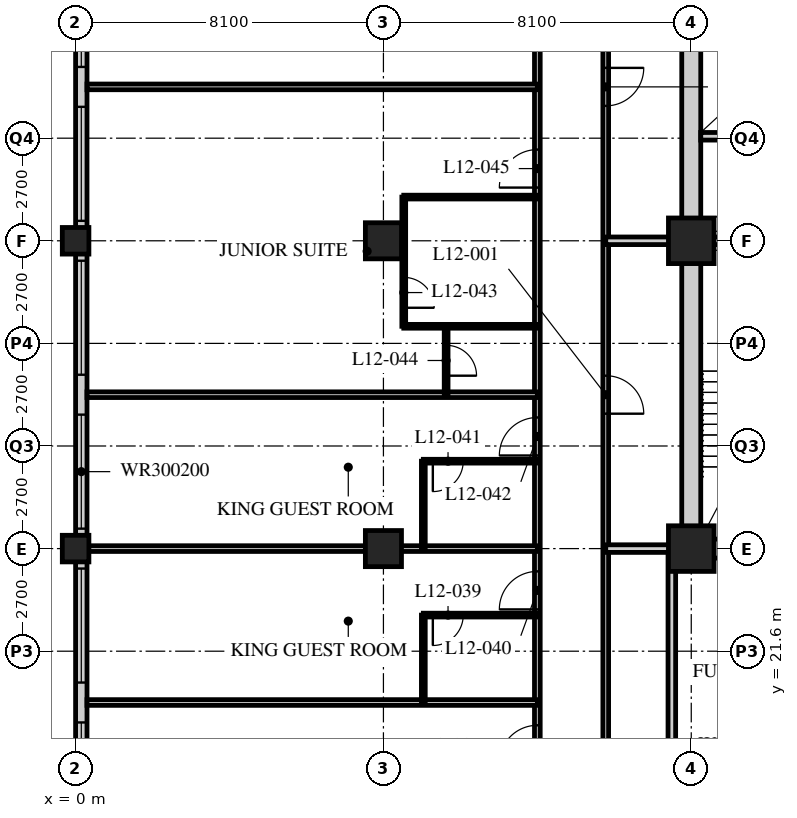
"""IFC4 building model, lengths in metres.
Left out: names, types, materials, properties, quantities, classifications, styles, units other than length and angle.
Written with IfcOpenShell. Run it as: python <this file> out.ifc"""

import sys

from ifc_helpers import new_model, si_unit, direction, frame, frame_2d, origin, origin_2d, place, context, subcontext, project, spatial, rectangle, hollow_rectangle, extrude, element, fill, save


model = new_model("IFC4")
c1 = context("Model", 3, precision=1e-05, world=origin(), true_north=direction((0.0, 1.0)))
c2 = subcontext(c1, "Body", "Model", "MODEL_VIEW")
j1 = project(units=[si_unit("LENGTHUNIT", "METRE"), si_unit("PLANEANGLEUNIT", "RADIAN")], contexts=[c1])
p1 = place(None, origin())
s1 = spatial("IfcSite", under=j1, at=p1, CompositionType="ELEMENT")
p2 = place(p1, origin())
s2 = spatial("IfcBuilding", under=s1, at=p2, CompositionType="ELEMENT")
p3 = place(p2, frame((0.0, 0.0, 53.4)))
s3 = spatial("IfcBuildingStorey", under=s2, at=p3, CompositionType="ELEMENT", Elevation=53.4)
for number, where, z_axis, x_axis in (
    (1, (0.0, 24.3, 0.0), (0.0, 0.0, 1.0), (1.0, 0.0, 0.0)),
    (2, (0.0, 32.4, 0.0), (0.0, 0.0, 1.0), (1.0, 0.0, 0.0)),
):
    element("IfcColumn", number, at=place(p3, frame(where, z_axis=z_axis, x_axis=x_axis)), inside=s3, PredefinedType="COLUMN", context=c2, shape_type="SweptSolid", body=[
        extrude(hollow_rectangle(XDim=0.7, YDim=0.7, WallThickness=0.06, at=origin_2d()), origin(), (0.0, 0.0, 1.0), 3.4),
    ])
for number, where, z_axis, x_axis in (
    (3, (8.1, 24.3, 0.0), (0.0, 0.0, 1.0), (1.0, 0.0, 0.0)),
    (4, (8.1, 32.4, 0.0), (0.0, 0.0, 1.0), (1.0, 0.0, 0.0)),
):
    element("IfcColumn", number, at=place(p3, frame(where, z_axis=z_axis, x_axis=x_axis)), inside=s3, PredefinedType="COLUMN", context=c2, shape_type="SweptSolid", body=[
        extrude(hollow_rectangle(XDim=0.95, YDim=0.95, WallThickness=0.095, at=origin_2d()), origin(), (0.0, 0.0, 1.0), 3.4),
    ])
for number, where, z_axis, x_axis in (
    (5, (16.2, 24.3, 0.0), (0.0, 0.0, 1.0), (1.0, 0.0, 0.0)),
    (6, (16.2, 32.4, 0.0), (0.0, 0.0, 1.0), (1.0, 0.0, 0.0)),
):
    element("IfcColumn", number, at=place(p3, frame(where, z_axis=z_axis, x_axis=x_axis)), inside=s3, PredefinedType="COLUMN", context=c2, shape_type="SweptSolid", body=[
        extrude(hollow_rectangle(XDim=1.2, YDim=1.2, WallThickness=0.12, at=origin_2d()), origin(), (0.0, 0.0, 1.0), 3.4),
    ])
p4 = place(p3, frame((0.15, 40.2, 0.0), z_axis=(0.0, 0.0, 1.0), x_axis=(0.0, -1.0, 0.0)))
e7 = element("IfcWall", 7, at=p4, inside=s3, PredefinedType="SOLIDWALL", context=c2, shape_type="SweptSolid", body=[
    extrude(rectangle(XDim=32.1, YDim=0.3, at=frame_2d((16.05, 0.0))), origin(), (0.0, 0.0, 1.0), 3.19),
])
p5 = place(p4, frame((0.225, 0.0, 0.9)))
e8 = element("IfcOpeningElement", 8, at=p5, cuts=e7, PredefinedType="OPENING", context=c2, shape_type="SweptSolid", body=[
    extrude(rectangle(XDim=3.0, YDim=2.0, at=frame_2d((1.5, 1.0))), frame((0.0, 0.16, 0.0), z_axis=(0.0, -1.0, 0.0), x_axis=(1.0, 0.0, 0.0)), (0.0, 0.0, 1.0), 0.32),
])
p6 = place(p4, frame((4.275, 0.0, 0.9)))
e9 = element("IfcOpeningElement", 9, at=p6, cuts=e7, PredefinedType="OPENING", context=c2, shape_type="SweptSolid", body=[
    extrude(rectangle(XDim=3.0, YDim=2.0, at=frame_2d((1.5, 1.0))), frame((0.0, 0.16, 0.0), z_axis=(0.0, -1.0, 0.0), x_axis=(1.0, 0.0, 0.0)), (0.0, 0.0, 1.0), 0.32),
])
p7 = place(p4, frame((8.325, 0.0, 0.9)))
e10 = element("IfcOpeningElement", 10, at=p7, cuts=e7, PredefinedType="OPENING", context=c2, shape_type="SweptSolid", body=[
    extrude(rectangle(XDim=3.0, YDim=2.0, at=frame_2d((1.5, 1.0))), frame((0.0, 0.16, 0.0), z_axis=(0.0, -1.0, 0.0), x_axis=(1.0, 0.0, 0.0)), (0.0, 0.0, 1.0), 0.32),
])
p8 = place(p4, frame((12.375, 0.0, 0.9)))
e11 = element("IfcOpeningElement", 11, at=p8, cuts=e7, PredefinedType="OPENING", context=c2, shape_type="SweptSolid", body=[
    extrude(rectangle(XDim=3.0, YDim=2.0, at=frame_2d((1.5, 1.0))), frame((0.0, 0.16, 0.0), z_axis=(0.0, -1.0, 0.0), x_axis=(1.0, 0.0, 0.0)), (0.0, 0.0, 1.0), 0.32),
])
p9 = place(p4, frame((16.425, 0.0, 0.9)))
e12 = element("IfcOpeningElement", 12, at=p9, cuts=e7, PredefinedType="OPENING", context=c2, shape_type="SweptSolid", body=[
    extrude(rectangle(XDim=3.0, YDim=2.0, at=frame_2d((1.5, 1.0))), frame((0.0, 0.16, 0.0), z_axis=(0.0, -1.0, 0.0), x_axis=(1.0, 0.0, 0.0)), (0.0, 0.0, 1.0), 0.32),
])
p10 = place(p4, frame((20.475, 0.0, 0.9)))
e13 = element("IfcOpeningElement", 13, at=p10, cuts=e7, PredefinedType="OPENING", context=c2, shape_type="SweptSolid", body=[
    extrude(rectangle(XDim=3.0, YDim=2.0, at=frame_2d((1.5, 1.0))), frame((0.0, 0.16, 0.0), z_axis=(0.0, -1.0, 0.0), x_axis=(1.0, 0.0, 0.0)), (0.0, 0.0, 1.0), 0.32),
])
p11 = place(p4, frame((24.525, 0.0, 0.9)))
e14 = element("IfcOpeningElement", 14, at=p11, cuts=e7, PredefinedType="OPENING", context=c2, shape_type="SweptSolid", body=[
    extrude(rectangle(XDim=3.0, YDim=2.0, at=frame_2d((1.5, 1.0))), frame((0.0, 0.16, 0.0), z_axis=(0.0, -1.0, 0.0), x_axis=(1.0, 0.0, 0.0)), (0.0, 0.0, 1.0), 0.32),
])
p12 = place(p4, frame((28.575, 0.0, 0.9)))
e15 = element("IfcOpeningElement", 15, at=p12, cuts=e7, PredefinedType="OPENING", context=c2, shape_type="SweptSolid", body=[
    extrude(rectangle(XDim=3.0, YDim=2.0, at=frame_2d((1.5, 1.0))), frame((0.0, 0.16, 0.0), z_axis=(0.0, -1.0, 0.0), x_axis=(1.0, 0.0, 0.0)), (0.0, 0.0, 1.0), 0.32),
])
p13 = place(p3, frame((12.15, 12.15, 0.0), z_axis=(0.0, 0.0, 1.0), x_axis=(0.0, 1.0, 0.0)))
e16 = element("IfcWall", 16, at=p13, inside=s3, PredefinedType="PARTITIONING", context=c2, shape_type="SweptSolid", body=[
    extrude(rectangle(XDim=30.15, YDim=0.15, at=frame_2d((15.075, 0.0))), origin(), (0.0, 0.0, 1.0), 3.19),
])
p14 = place(p13, frame((2.45, 0.0, 0.0)))
e17 = element("IfcOpeningElement", 17, at=p14, cuts=e16, PredefinedType="OPENING", context=c2, shape_type="SweptSolid", body=[
    extrude(rectangle(XDim=1.0, YDim=2.1, at=frame_2d((0.5, 1.05))), frame((0.0, 0.085, 0.0), z_axis=(0.0, -1.0, 0.0), x_axis=(1.0, 0.0, 0.0)), (0.0, 0.0, 1.0), 0.17),
])
p15 = place(p13, frame((6.5, 0.0, 0.0)))
e18 = element("IfcOpeningElement", 18, at=p15, cuts=e16, PredefinedType="OPENING", context=c2, shape_type="SweptSolid", body=[
    extrude(rectangle(XDim=1.0, YDim=2.1, at=frame_2d((0.5, 1.05))), frame((0.0, 0.085, 0.0), z_axis=(0.0, -1.0, 0.0), x_axis=(1.0, 0.0, 0.0)), (0.0, 0.0, 1.0), 0.17),
])
p16 = place(p13, frame((10.55, 0.0, 0.0)))
e19 = element("IfcOpeningElement", 19, at=p16, cuts=e16, PredefinedType="OPENING", context=c2, shape_type="SweptSolid", body=[
    extrude(rectangle(XDim=1.0, YDim=2.1, at=frame_2d((0.5, 1.05))), frame((0.0, 0.085, 0.0), z_axis=(0.0, -1.0, 0.0), x_axis=(1.0, 0.0, 0.0)), (0.0, 0.0, 1.0), 0.17),
])
p17 = place(p13, frame((14.6, 0.0, 0.0)))
e20 = element("IfcOpeningElement", 20, at=p17, cuts=e16, PredefinedType="OPENING", context=c2, shape_type="SweptSolid", body=[
    extrude(rectangle(XDim=1.0, YDim=2.1, at=frame_2d((0.5, 1.05))), frame((0.0, 0.085, 0.0), z_axis=(0.0, -1.0, 0.0), x_axis=(1.0, 0.0, 0.0)), (0.0, 0.0, 1.0), 0.17),
])
p18 = place(p13, frame((21.65, 0.0, 0.0)))
e21 = element("IfcOpeningElement", 21, at=p18, cuts=e16, PredefinedType="OPENING", context=c2, shape_type="SweptSolid", body=[
    extrude(rectangle(XDim=1.0, YDim=2.1, at=frame_2d((0.5, 1.05))), frame((0.0, 0.085, 0.0), z_axis=(0.0, -1.0, 0.0), x_axis=(1.0, 0.0, 0.0)), (0.0, 0.0, 1.0), 0.17),
])
p19 = place(p13, frame((26.7, 0.0, 0.0)))
e22 = element("IfcOpeningElement", 22, at=p19, cuts=e16, PredefinedType="OPENING", context=c2, shape_type="SweptSolid", body=[
    extrude(rectangle(XDim=1.0, YDim=2.1, at=frame_2d((0.5, 1.05))), frame((0.0, 0.085, 0.0), z_axis=(0.0, -1.0, 0.0), x_axis=(1.0, 0.0, 0.0)), (0.0, 0.0, 1.0), 0.17),
])
p20 = place(p3, frame((13.95, 40.5, 0.0), z_axis=(0.0, 0.0, 1.0), x_axis=(0.0, -1.0, 0.0)))
e23 = element("IfcWall", 23, at=p20, inside=s3, PredefinedType="PARTITIONING", context=c2, shape_type="SweptSolid", body=[
    extrude(rectangle(XDim=26.55, YDim=0.15, at=frame_2d((13.275, 0.0))), origin(), (0.0, 0.0, 1.0), 3.19),
])
p21 = place(p20, frame((11.65, 0.0, 0.0)))
e24 = element("IfcOpeningElement", 24, at=p21, cuts=e23, PredefinedType="OPENING", context=c2, shape_type="SweptSolid", body=[
    extrude(rectangle(XDim=1.0, YDim=2.1, at=frame_2d((0.5, 1.05))), frame((0.0, 0.085, 0.0), z_axis=(0.0, -1.0, 0.0), x_axis=(1.0, 0.0, 0.0)), (0.0, 0.0, 1.0), 0.17),
])
p22 = place(p20, frame((3.55, 0.0, 0.0)))
e25 = element("IfcOpeningElement", 25, at=p22, cuts=e23, PredefinedType="OPENING", context=c2, shape_type="SweptSolid", body=[
    extrude(rectangle(XDim=1.0, YDim=2.1, at=frame_2d((0.5, 1.05))), frame((0.0, 0.085, 0.0), z_axis=(0.0, -1.0, 0.0), x_axis=(1.0, 0.0, 0.0)), (0.0, 0.0, 1.0), 0.17),
])
p23 = place(p3, frame((13.95, 32.4, 0.0), z_axis=(0.0, 0.0, 1.0), x_axis=(1.0, 0.0, 0.0)))
e26 = element("IfcWall", 26, at=p23, inside=s3, PredefinedType="SOLIDWALL", context=c2, shape_type="SweptSolid", body=[
    extrude(rectangle(XDim=2.25, YDim=0.2, at=frame_2d((1.125, 0.0))), origin(), (0.0, 0.0, 1.0), 2.578),
])
p24 = place(p3, frame((15.689, 13.95, 0.0), z_axis=(0.0, 0.0, 1.0), x_axis=(0.0, 1.0, 0.0)))
e27 = element("IfcWall", 27, at=p24, inside=s3, PredefinedType="SOLIDWALL", context=c2, shape_type="SweptSolid", body=[
    extrude(rectangle(XDim=10.35, YDim=0.2, at=frame_2d((5.175, 0.0))), origin(), (0.0, 0.0, 1.0), 3.19),
])
p25 = place(p3, frame((13.95, 24.3, 0.0), z_axis=(0.0, 0.0, 1.0), x_axis=(1.0, 0.0, 0.0)))
e28 = element("IfcWall", 28, at=p25, inside=s3, PredefinedType="SOLIDWALL", context=c2, shape_type="SweptSolid", body=[
    extrude(rectangle(XDim=2.25, YDim=0.2, at=frame_2d((1.125, 0.0))), origin(), (0.0, 0.0, 1.0), 2.578),
])
p26 = place(p3, frame((12.15, 20.25, 0.0), z_axis=(0.0, 0.0, 1.0), x_axis=(-1.0, 0.0, 0.0)))
e29 = element("IfcWall", 29, at=p26, inside=s3, PredefinedType="PARTITIONING", context=c2, shape_type="SweptSolid", body=[
    extrude(rectangle(XDim=11.85, YDim=0.15, at=frame_2d((5.925, 0.0))), origin(), (0.0, 0.0, 1.0), 3.19),
])
p27 = place(p3, frame((9.15, 20.25, 0.0), z_axis=(0.0, 0.0, 1.0), x_axis=(0.0, 1.0, 0.0)))
e30 = element("IfcWall", 30, at=p27, inside=s3, PredefinedType="PARTITIONING", context=c2, shape_type="SweptSolid", body=[
    extrude(rectangle(XDim=2.3, YDim=0.1, at=frame_2d((1.15, 0.0))), origin(), (0.0, 0.0, 1.0), 3.19),
])
p28 = place(p3, frame((12.15, 22.55, 0.0), z_axis=(0.0, 0.0, 1.0), x_axis=(-1.0, 0.0, 0.0)))
e31 = element("IfcWall", 31, at=p28, inside=s3, PredefinedType="PARTITIONING", context=c2, shape_type="SweptSolid", body=[
    extrude(rectangle(XDim=3.0, YDim=0.1, at=frame_2d((1.5, 0.0))), origin(), (0.0, 0.0, 1.0), 3.19),
])
p29 = place(p28, frame((1.95, 0.0, 0.0)))
e32 = element("IfcOpeningElement", 32, at=p29, cuts=e31, PredefinedType="OPENING", context=c2, shape_type="SweptSolid", body=[
    extrude(rectangle(XDim=0.8, YDim=2.1, at=frame_2d((0.4, 1.05))), frame((0.0, 0.06, 0.0), z_axis=(0.0, -1.0, 0.0), x_axis=(1.0, 0.0, 0.0)), (0.0, 0.0, 1.0), 0.12),
])
p30 = place(p3, frame((12.15, 24.3, 0.0), z_axis=(0.0, 0.0, 1.0), x_axis=(-1.0, 0.0, 0.0)))
e33 = element("IfcWall", 33, at=p30, inside=s3, PredefinedType="PARTITIONING", context=c2, shape_type="SweptSolid", body=[
    extrude(rectangle(XDim=11.85, YDim=0.15, at=frame_2d((5.925, 0.0))), origin(), (0.0, 0.0, 1.0), 2.578),
])
p31 = place(p3, frame((9.15, 24.3, 0.0), z_axis=(0.0, 0.0, 1.0), x_axis=(0.0, 1.0, 0.0)))
e34 = element("IfcWall", 34, at=p31, inside=s3, PredefinedType="PARTITIONING", context=c2, shape_type="SweptSolid", body=[
    extrude(rectangle(XDim=2.3, YDim=0.1, at=frame_2d((1.15, 0.0))), origin(), (0.0, 0.0, 1.0), 3.19),
])
p32 = place(p3, frame((12.15, 26.6, 0.0), z_axis=(0.0, 0.0, 1.0), x_axis=(-1.0, 0.0, 0.0)))
e35 = element("IfcWall", 35, at=p32, inside=s3, PredefinedType="PARTITIONING", context=c2, shape_type="SweptSolid", body=[
    extrude(rectangle(XDim=3.0, YDim=0.1, at=frame_2d((1.5, 0.0))), origin(), (0.0, 0.0, 1.0), 3.19),
])
p33 = place(p32, frame((1.95, 0.0, 0.0)))
e36 = element("IfcOpeningElement", 36, at=p33, cuts=e35, PredefinedType="OPENING", context=c2, shape_type="SweptSolid", body=[
    extrude(rectangle(XDim=0.8, YDim=2.1, at=frame_2d((0.4, 1.05))), frame((0.0, 0.06, 0.0), z_axis=(0.0, -1.0, 0.0), x_axis=(1.0, 0.0, 0.0)), (0.0, 0.0, 1.0), 0.12),
])
p34 = place(p3, frame((12.15, 28.35, 0.0), z_axis=(0.0, 0.0, 1.0), x_axis=(-1.0, 0.0, 0.0)))
e37 = element("IfcWall", 37, at=p34, inside=s3, PredefinedType="PARTITIONING", context=c2, shape_type="SweptSolid", body=[
    extrude(rectangle(XDim=11.85, YDim=0.15, at=frame_2d((5.925, 0.0))), origin(), (0.0, 0.0, 1.0), 3.19),
])
p35 = place(p3, frame((8.635, 30.15, 0.0), z_axis=(0.0, 0.0, 1.0), x_axis=(0.0, 1.0, 0.0)))
e38 = element("IfcWall", 38, at=p35, inside=s3, PredefinedType="PARTITIONING", context=c2, shape_type="SweptSolid", body=[
    extrude(rectangle(XDim=3.4, YDim=0.1, at=frame_2d((1.7, 0.0))), origin(), (0.0, 0.0, 1.0), 3.19),
])
p36 = place(p35, frame((0.488, 0.0, 0.0)))
e39 = element("IfcOpeningElement", 39, at=p36, cuts=e38, PredefinedType="OPENING", context=c2, shape_type="SweptSolid", body=[
    extrude(rectangle(XDim=0.8, YDim=2.1, at=frame_2d((0.4, 1.05))), frame((0.0, 0.06, 0.0), z_axis=(0.0, -1.0, 0.0), x_axis=(1.0, 0.0, 0.0)), (0.0, 0.0, 1.0), 0.12),
])
p37 = place(p3, frame((9.75, 28.35, 0.0), z_axis=(0.0, 0.0, 1.0), x_axis=(0.0, 1.0, 0.0)))
e40 = element("IfcWall", 40, at=p37, inside=s3, PredefinedType="PARTITIONING", context=c2, shape_type="SweptSolid", body=[
    extrude(rectangle(XDim=1.8, YDim=0.1, at=frame_2d((0.9, 0.0))), origin(), (0.0, 0.0, 1.0), 3.19),
])
p38 = place(p37, frame((0.5, 0.0, 0.0)))
e41 = element("IfcOpeningElement", 41, at=p38, cuts=e40, PredefinedType="OPENING", context=c2, shape_type="SweptSolid", body=[
    extrude(rectangle(XDim=0.8, YDim=2.1, at=frame_2d((0.4, 1.05))), frame((0.0, 0.06, 0.0), z_axis=(0.0, -1.0, 0.0), x_axis=(1.0, 0.0, 0.0)), (0.0, 0.0, 1.0), 0.12),
])
for number, where, z_axis, x_axis in (
    (42, (12.15, 30.15, 0.0), (0.0, 0.0, 1.0), (-1.0, 0.0, 0.0)),
    (43, (12.15, 33.55, 0.0), (0.0, 0.0, 1.0), (-1.0, 0.0, 0.0)),
):
    element("IfcWall", number, at=place(p3, frame(where, z_axis=z_axis, x_axis=x_axis)), inside=s3, PredefinedType="PARTITIONING", context=c2, shape_type="SweptSolid", body=[
        extrude(rectangle(XDim=3.515, YDim=0.1, at=frame_2d((1.757, 0.0))), origin(), (0.0, 0.0, 1.0), 3.19),
    ])
p39 = place(p3, frame((12.15, 36.45, 0.0), z_axis=(0.0, 0.0, 1.0), x_axis=(-1.0, 0.0, 0.0)))
e44 = element("IfcWall", 44, at=p39, inside=s3, PredefinedType="PARTITIONING", context=c2, shape_type="SweptSolid", body=[
    extrude(rectangle(XDim=11.85, YDim=0.15, at=frame_2d((5.925, 0.0))), origin(), (0.0, 0.0, 1.0), 3.19),
])
p40 = place(p3, frame((15.95, 24.3, 0.0), z_axis=(0.0, 0.0, 1.0), x_axis=(1.0, 0.0, 0.0)))
e45 = element("IfcWall", 45, at=p40, inside=s3, PredefinedType="SOLIDWALL", context=c2, shape_type="SweptSolid", body=[
    extrude(rectangle(XDim=24.8, YDim=0.5, at=frame_2d((12.4, 0.0))), origin(), (0.0, 0.0, 1.0), 2.54),
])
p41 = place(p40, frame((11.5, 0.0, 0.0)))
e46 = element("IfcOpeningElement", 46, at=p41, cuts=e45, PredefinedType="OPENING", context=c2, shape_type="SweptSolid", body=[
    extrude(rectangle(XDim=1.8, YDim=2.4, at=frame_2d((0.9, 1.2))), frame((0.0, 0.26, 0.0), z_axis=(0.0, -1.0, 0.0), x_axis=(1.0, 0.0, 0.0)), (0.0, 0.0, 1.0), 0.52),
])
p42 = place(p3, frame((16.2, 24.55, 0.0), z_axis=(0.0, 0.0, 1.0), x_axis=(0.0, 1.0, 0.0)))
e47 = element("IfcWall", 47, at=p42, inside=s3, PredefinedType="SOLIDWALL", context=c2, shape_type="SweptSolid", body=[
    extrude(rectangle(XDim=15.7, YDim=0.5, at=frame_2d((7.85, 0.0))), origin(), (0.0, 0.0, 1.0), 2.578),
])
p43 = place(p3, frame((16.45, 32.4, 0.0), z_axis=(0.0, 0.0, 1.0), x_axis=(1.0, 0.0, 0.0)))
e48 = element("IfcWall", 48, at=p43, inside=s3, PredefinedType="SOLIDWALL", context=c2, shape_type="SweptSolid", body=[
    extrude(rectangle(XDim=7.95, YDim=0.2, at=frame_2d((3.975, 0.0))), origin(), (0.0, 0.0, 1.0), 2.578),
])
p44 = place(p3, frame((16.45, 35.15, 0.0), z_axis=(0.0, 0.0, 1.0), x_axis=(1.0, 0.0, 0.0)))
e49 = element("IfcWall", 49, at=p44, inside=s3, PredefinedType="SOLIDWALL", context=c2, shape_type="SweptSolid", body=[
    extrude(rectangle(XDim=2.6, YDim=0.2, at=frame_2d((1.3, 0.0))), origin(), (0.0, 0.0, 1.0), 3.19),
])
p45 = place(p5, origin())
e50 = element("IfcWindow", 50, at=p45, inside=s3, PartitioningType="SINGLE_PANEL", PredefinedType="WINDOW", context=c2, shape_type="SweptSolid", body=[
    extrude(rectangle(XDim=3.0, YDim=2.0, at=frame_2d((1.5, 1.0))), frame((0.0, 0.03, 0.0), z_axis=(0.0, -1.0, 0.0), x_axis=(1.0, 0.0, 0.0)), (0.0, 0.0, 1.0), 0.06),
])
fill(e8, e50)
p46 = place(p6, origin())
e51 = element("IfcWindow", 51, at=p46, inside=s3, PartitioningType="SINGLE_PANEL", PredefinedType="WINDOW", context=c2, shape_type="SweptSolid", body=[
    extrude(rectangle(XDim=3.0, YDim=2.0, at=frame_2d((1.5, 1.0))), frame((0.0, 0.03, 0.0), z_axis=(0.0, -1.0, 0.0), x_axis=(1.0, 0.0, 0.0)), (0.0, 0.0, 1.0), 0.06),
])
fill(e9, e51)
p47 = place(p7, origin())
e52 = element("IfcWindow", 52, at=p47, inside=s3, PartitioningType="SINGLE_PANEL", PredefinedType="WINDOW", context=c2, shape_type="SweptSolid", body=[
    extrude(rectangle(XDim=3.0, YDim=2.0, at=frame_2d((1.5, 1.0))), frame((0.0, 0.03, 0.0), z_axis=(0.0, -1.0, 0.0), x_axis=(1.0, 0.0, 0.0)), (0.0, 0.0, 1.0), 0.06),
])
fill(e10, e52)
p48 = place(p8, origin())
e53 = element("IfcWindow", 53, at=p48, inside=s3, PartitioningType="SINGLE_PANEL", PredefinedType="WINDOW", context=c2, shape_type="SweptSolid", body=[
    extrude(rectangle(XDim=3.0, YDim=2.0, at=frame_2d((1.5, 1.0))), frame((0.0, 0.03, 0.0), z_axis=(0.0, -1.0, 0.0), x_axis=(1.0, 0.0, 0.0)), (0.0, 0.0, 1.0), 0.06),
])
fill(e11, e53)
p49 = place(p9, origin())
e54 = element("IfcWindow", 54, at=p49, inside=s3, PartitioningType="SINGLE_PANEL", PredefinedType="WINDOW", context=c2, shape_type="SweptSolid", body=[
    extrude(rectangle(XDim=3.0, YDim=2.0, at=frame_2d((1.5, 1.0))), frame((0.0, 0.03, 0.0), z_axis=(0.0, -1.0, 0.0), x_axis=(1.0, 0.0, 0.0)), (0.0, 0.0, 1.0), 0.06),
])
fill(e12, e54)
p50 = place(p10, origin())
e55 = element("IfcWindow", 55, at=p50, inside=s3, PartitioningType="SINGLE_PANEL", PredefinedType="WINDOW", context=c2, shape_type="SweptSolid", body=[
    extrude(rectangle(XDim=3.0, YDim=2.0, at=frame_2d((1.5, 1.0))), frame((0.0, 0.03, 0.0), z_axis=(0.0, -1.0, 0.0), x_axis=(1.0, 0.0, 0.0)), (0.0, 0.0, 1.0), 0.06),
])
fill(e13, e55)
p51 = place(p21, origin())
e56 = element("IfcDoor", 56, at=p51, inside=s3, OperationType="SINGLE_SWING_RIGHT", PredefinedType="DOOR", context=c2, shape_type="SweptSolid", body=[
    extrude(rectangle(XDim=1.0, YDim=2.1, at=frame_2d((0.5, 1.05))), frame((0.0, 0.025, 0.0), z_axis=(0.0, -1.0, 0.0), x_axis=(1.0, 0.0, 0.0)), (0.0, 0.0, 1.0), 0.05),
])
fill(e24, e56)
p52 = place(p22, origin())
e57 = element("IfcDoor", 57, at=p52, inside=s3, OperationType="SINGLE_SWING_LEFT", PredefinedType="DOOR", context=c2, shape_type="SweptSolid", body=[
    extrude(rectangle(XDim=1.0, YDim=2.1, at=frame_2d((0.5, 1.05))), frame((0.0, 0.025, 0.0), z_axis=(0.0, -1.0, 0.0), x_axis=(1.0, 0.0, 0.0)), (0.0, 0.0, 1.0), 0.05),
])
fill(e25, e57)
p53 = place(p15, origin())
e58 = element("IfcDoor", 58, at=p53, inside=s3, OperationType="SINGLE_SWING_LEFT", PredefinedType="DOOR", context=c2, shape_type="SweptSolid", body=[
    extrude(rectangle(XDim=1.0, YDim=2.1, at=frame_2d((0.5, 1.05))), frame((0.0, 0.025, 0.0), z_axis=(0.0, -1.0, 0.0), x_axis=(1.0, 0.0, 0.0)), (0.0, 0.0, 1.0), 0.05),
])
fill(e18, e58)
p54 = place(p29, origin())
e59 = element("IfcDoor", 59, at=p54, inside=s3, OperationType="SINGLE_SWING_RIGHT", PredefinedType="DOOR", context=c2, shape_type="SweptSolid", body=[
    extrude(rectangle(XDim=0.8, YDim=2.1, at=frame_2d((0.4, 1.05))), frame((0.0, 0.025, 0.0), z_axis=(0.0, -1.0, 0.0), x_axis=(1.0, 0.0, 0.0)), (0.0, 0.0, 1.0), 0.05),
])
fill(e32, e59)
p55 = place(p16, origin())
e60 = element("IfcDoor", 60, at=p55, inside=s3, OperationType="SINGLE_SWING_LEFT", PredefinedType="DOOR", context=c2, shape_type="SweptSolid", body=[
    extrude(rectangle(XDim=1.0, YDim=2.1, at=frame_2d((0.5, 1.05))), frame((0.0, 0.025, 0.0), z_axis=(0.0, -1.0, 0.0), x_axis=(1.0, 0.0, 0.0)), (0.0, 0.0, 1.0), 0.05),
])
fill(e19, e60)
p56 = place(p33, origin())
e61 = element("IfcDoor", 61, at=p56, inside=s3, OperationType="SINGLE_SWING_RIGHT", PredefinedType="DOOR", context=c2, shape_type="SweptSolid", body=[
    extrude(rectangle(XDim=0.8, YDim=2.1, at=frame_2d((0.4, 1.05))), frame((0.0, 0.025, 0.0), z_axis=(0.0, -1.0, 0.0), x_axis=(1.0, 0.0, 0.0)), (0.0, 0.0, 1.0), 0.05),
])
fill(e36, e61)
p57 = place(p17, origin())
e62 = element("IfcDoor", 62, at=p57, inside=s3, OperationType="SINGLE_SWING_LEFT", PredefinedType="DOOR", context=c2, shape_type="SweptSolid", body=[
    extrude(rectangle(XDim=1.0, YDim=2.1, at=frame_2d((0.5, 1.05))), frame((0.0, 0.025, 0.0), z_axis=(0.0, -1.0, 0.0), x_axis=(1.0, 0.0, 0.0)), (0.0, 0.0, 1.0), 0.05),
])
fill(e20, e62)
p58 = place(p36, origin())
e63 = element("IfcDoor", 63, at=p58, inside=s3, OperationType="SINGLE_SWING_RIGHT", PredefinedType="DOOR", context=c2, shape_type="SweptSolid", body=[
    extrude(rectangle(XDim=0.8, YDim=2.1, at=frame_2d((0.4, 1.05))), frame((0.0, 0.025, 0.0), z_axis=(0.0, -1.0, 0.0), x_axis=(1.0, 0.0, 0.0)), (0.0, 0.0, 1.0), 0.05),
])
fill(e39, e63)
p59 = place(p38, origin())
e64 = element("IfcDoor", 64, at=p59, inside=s3, OperationType="SINGLE_SWING_RIGHT", PredefinedType="DOOR", context=c2, shape_type="SweptSolid", body=[
    extrude(rectangle(XDim=0.8, YDim=2.1, at=frame_2d((0.4, 1.05))), frame((0.0, 0.025, 0.0), z_axis=(0.0, -1.0, 0.0), x_axis=(1.0, 0.0, 0.0)), (0.0, 0.0, 1.0), 0.05),
])
fill(e41, e64)
p60 = place(p18, origin())
e65 = element("IfcDoor", 65, at=p60, inside=s3, OperationType="SINGLE_SWING_LEFT", PredefinedType="DOOR", context=c2, shape_type="SweptSolid", body=[
    extrude(rectangle(XDim=1.0, YDim=2.1, at=frame_2d((0.5, 1.05))), frame((0.0, 0.025, 0.0), z_axis=(0.0, -1.0, 0.0), x_axis=(1.0, 0.0, 0.0)), (0.0, 0.0, 1.0), 0.05),
])
fill(e21, e65)
save(model, sys.argv[1])
